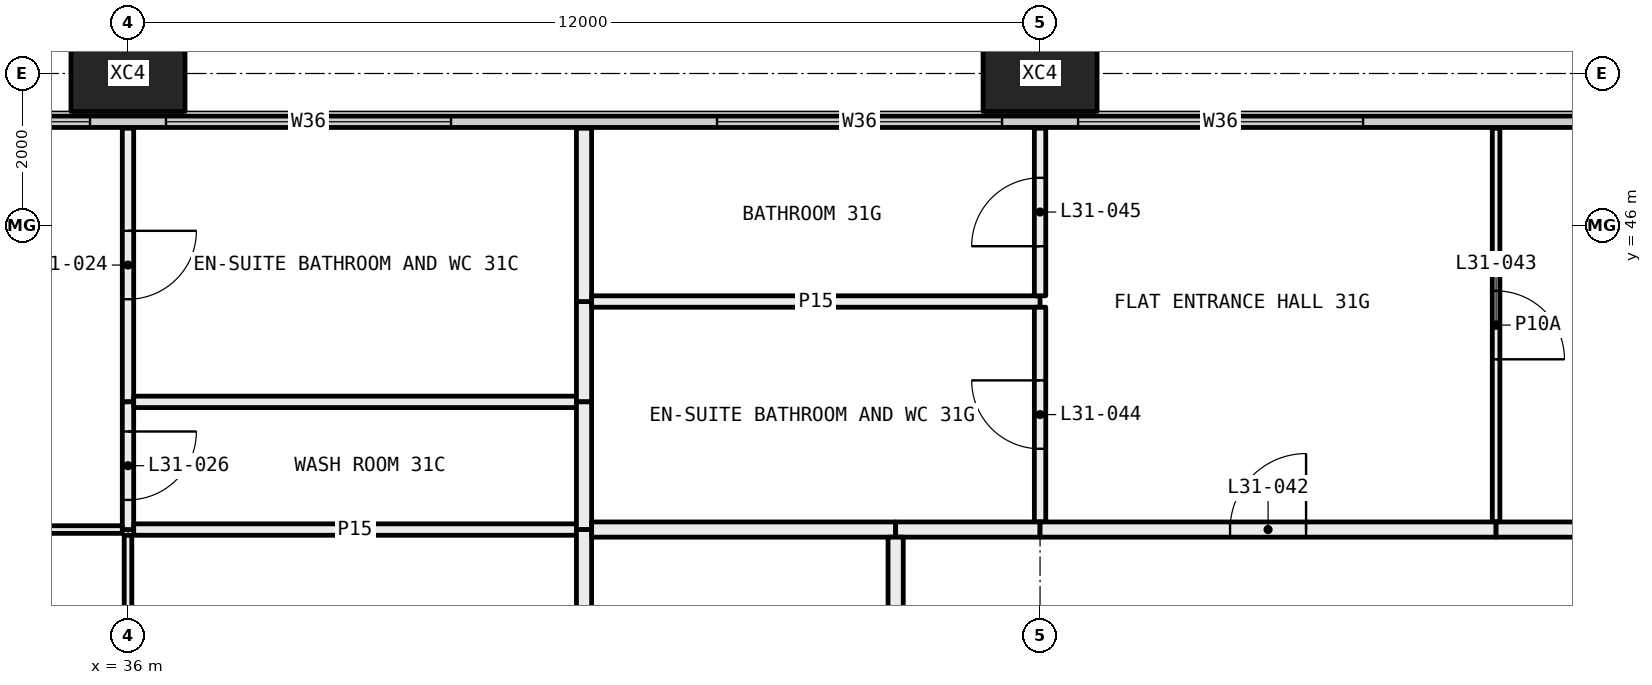
"""IFC4 building model, lengths in metres.
Left out: names, types, materials, properties, quantities, classifications, styles, units other than length and angle.
Written with IfcOpenShell. Run it as: python <this file> out.ifc"""

import sys

from ifc_helpers import new_model, si_unit, direction, frame, frame_2d, origin, origin_2d, place, context, subcontext, project, spatial, rectangle, hollow_rectangle, extrude, element, fill, save


model = new_model("IFC4")
c1 = context("Model", 3, precision=1e-05, world=origin(), true_north=direction((0.0, 1.0)))
c2 = subcontext(c1, "Body", "Model", "MODEL_VIEW")
j1 = project(units=[si_unit("LENGTHUNIT", "METRE"), si_unit("PLANEANGLEUNIT", "RADIAN")], contexts=[c1])
p1 = place(None, origin())
s1 = spatial("IfcSite", under=j1, at=p1, CompositionType="ELEMENT")
p2 = place(p1, origin())
s2 = spatial("IfcBuilding", under=s1, at=p2, CompositionType="ELEMENT")
p3 = place(p2, frame((0.0, 0.0, 120.75)))
s3 = spatial("IfcBuildingStorey", under=s2, at=p3, CompositionType="ELEMENT", Elevation=120.75)
for number, where, z_axis, x_axis in (
    (1, (36.0, 48.0, -0.4), (0.0, 0.0, 1.0), (1.0, 0.0, 0.0)),
    (2, (48.0, 48.0, -0.4), (0.0, 0.0, 1.0), (1.0, 0.0, 0.0)),
):
    element("IfcColumn", number, at=place(p3, frame(where, z_axis=z_axis, x_axis=x_axis)), inside=s3, PredefinedType="COLUMN", context=c2, shape_type="SweptSolid", body=[
        extrude(hollow_rectangle(XDim=1.5, YDim=1.0, WallThickness=0.06, at=origin_2d()), origin(), (0.0, 0.0, 1.0), 3.45),
    ])
p4 = place(p3, frame((6.56, 47.365, 0.0), z_axis=(0.0, 0.0, 1.0), x_axis=(1.0, 0.0, 0.0)))
e3 = element("IfcWall", 3, at=p4, inside=s3, PredefinedType="ELEMENTEDWALL", context=c2, shape_type="SweptSolid", body=[
    extrude(rectangle(XDim=58.88, YDim=0.15, at=frame_2d((29.44, 0.0))), origin(), (0.0, 0.0, 1.0), 3.05),
])
p5 = place(p4, frame((0.44, 0.0, 0.45)))
e4 = element("IfcOpeningElement", 4, at=p5, cuts=e3, PredefinedType="OPENING", context=c2, shape_type="SweptSolid", body=[
    extrude(rectangle(XDim=4.5, YDim=2.55, at=frame_2d((2.25, 1.275))), frame((0.0, 0.085, 0.0), z_axis=(0.0, -1.0, 0.0), x_axis=(1.0, 0.0, 0.0)), (0.0, 0.0, 1.0), 0.17),
])
p6 = place(p4, frame((5.94, 0.0, 0.45)))
e5 = element("IfcOpeningElement", 5, at=p6, cuts=e3, PredefinedType="OPENING", context=c2, shape_type="SweptSolid", body=[
    extrude(rectangle(XDim=3.75, YDim=2.55, at=frame_2d((1.875, 1.275))), frame((0.0, 0.085, 0.0), z_axis=(0.0, -1.0, 0.0), x_axis=(1.0, 0.0, 0.0)), (0.0, 0.0, 1.0), 0.17),
])
p7 = place(p4, frame((13.19, 0.0, 0.45)))
e6 = element("IfcOpeningElement", 6, at=p7, cuts=e3, PredefinedType="OPENING", context=c2, shape_type="SweptSolid", body=[
    extrude(rectangle(XDim=3.75, YDim=2.55, at=frame_2d((1.875, 1.275))), frame((0.0, 0.085, 0.0), z_axis=(0.0, -1.0, 0.0), x_axis=(1.0, 0.0, 0.0)), (0.0, 0.0, 1.0), 0.17),
])
p8 = place(p4, frame((17.94, 0.0, 0.45)))
e7 = element("IfcOpeningElement", 7, at=p8, cuts=e3, PredefinedType="OPENING", context=c2, shape_type="SweptSolid", body=[
    extrude(rectangle(XDim=3.75, YDim=2.55, at=frame_2d((1.875, 1.275))), frame((0.0, 0.085, 0.0), z_axis=(0.0, -1.0, 0.0), x_axis=(1.0, 0.0, 0.0)), (0.0, 0.0, 1.0), 0.17),
])
p9 = place(p4, frame((25.19, 0.0, 0.45)))
e8 = element("IfcOpeningElement", 8, at=p9, cuts=e3, PredefinedType="OPENING", context=c2, shape_type="SweptSolid", body=[
    extrude(rectangle(XDim=0.75, YDim=2.55, at=frame_2d((0.375, 1.275))), frame((0.0, 0.085, 0.0), z_axis=(0.0, -1.0, 0.0), x_axis=(1.0, 0.0, 0.0)), (0.0, 0.0, 1.0), 0.17),
])
p10 = place(p4, frame((26.94, 0.0, 0.45)))
e9 = element("IfcOpeningElement", 9, at=p10, cuts=e3, PredefinedType="OPENING", context=c2, shape_type="SweptSolid", body=[
    extrude(rectangle(XDim=2.0, YDim=2.55, at=frame_2d((1.0, 1.275))), frame((0.0, 0.085, 0.0), z_axis=(0.0, -1.0, 0.0), x_axis=(1.0, 0.0, 0.0)), (0.0, 0.0, 1.0), 0.17),
])
p11 = place(p4, frame((29.94, 0.0, 0.45)))
e10 = element("IfcOpeningElement", 10, at=p11, cuts=e3, PredefinedType="OPENING", context=c2, shape_type="SweptSolid", body=[
    extrude(rectangle(XDim=3.75, YDim=2.55, at=frame_2d((1.875, 1.275))), frame((0.0, 0.085, 0.0), z_axis=(0.0, -1.0, 0.0), x_axis=(1.0, 0.0, 0.0)), (0.0, 0.0, 1.0), 0.17),
])
p12 = place(p4, frame((37.19, 0.0, 0.45)))
e11 = element("IfcOpeningElement", 11, at=p12, cuts=e3, PredefinedType="OPENING", context=c2, shape_type="SweptSolid", body=[
    extrude(rectangle(XDim=3.75, YDim=2.55, at=frame_2d((1.875, 1.275))), frame((0.0, 0.085, 0.0), z_axis=(0.0, -1.0, 0.0), x_axis=(1.0, 0.0, 0.0)), (0.0, 0.0, 1.0), 0.17),
])
p13 = place(p4, frame((41.94, 0.0, 0.45)))
e12 = element("IfcOpeningElement", 12, at=p13, cuts=e3, PredefinedType="OPENING", context=c2, shape_type="SweptSolid", body=[
    extrude(rectangle(XDim=3.75, YDim=2.55, at=frame_2d((1.875, 1.275))), frame((0.0, 0.085, 0.0), z_axis=(0.0, -1.0, 0.0), x_axis=(1.0, 0.0, 0.0)), (0.0, 0.0, 1.0), 0.17),
])
p14 = place(p4, frame((49.19, 0.0, 0.45)))
e13 = element("IfcOpeningElement", 13, at=p14, cuts=e3, PredefinedType="OPENING", context=c2, shape_type="SweptSolid", body=[
    extrude(rectangle(XDim=0.75, YDim=2.55, at=frame_2d((0.375, 1.275))), frame((0.0, 0.085, 0.0), z_axis=(0.0, -1.0, 0.0), x_axis=(1.0, 0.0, 0.0)), (0.0, 0.0, 1.0), 0.17),
])
p15 = place(p4, frame((50.94, 0.0, 0.45)))
e14 = element("IfcOpeningElement", 14, at=p15, cuts=e3, PredefinedType="OPENING", context=c2, shape_type="SweptSolid", body=[
    extrude(rectangle(XDim=2.0, YDim=2.55, at=frame_2d((1.0, 1.275))), frame((0.0, 0.085, 0.0), z_axis=(0.0, -1.0, 0.0), x_axis=(1.0, 0.0, 0.0)), (0.0, 0.0, 1.0), 0.17),
])
p16 = place(p4, frame((53.94, 0.0, 0.45)))
e15 = element("IfcOpeningElement", 15, at=p16, cuts=e3, PredefinedType="OPENING", context=c2, shape_type="SweptSolid", body=[
    extrude(rectangle(XDim=4.5, YDim=2.55, at=frame_2d((2.25, 1.275))), frame((0.0, 0.085, 0.0), z_axis=(0.0, -1.0, 0.0), x_axis=(1.0, 0.0, 0.0)), (0.0, 0.0, 1.0), 0.17),
])
p17 = place(p3, frame((36.0, 43.68, 0.0), z_axis=(0.0, 0.0, 1.0), x_axis=(0.0, 1.0, 0.0)))
e16 = element("IfcWall", 16, at=p17, inside=s3, PredefinedType="PARTITIONING", context=c2, shape_type="SweptSolid", body=[
    extrude(rectangle(XDim=3.6, YDim=0.15, at=frame_2d((1.8, 0.0))), origin(), (0.0, 0.0, 1.0), 2.45),
])
p18 = place(p17, frame((1.35, 0.0, 0.0)))
e17 = element("IfcOpeningElement", 17, at=p18, cuts=e16, PredefinedType="OPENING", context=c2, shape_type="SweptSolid", body=[
    extrude(rectangle(XDim=0.9, YDim=2.1, at=frame_2d((0.45, 1.05))), frame((0.0, 0.085, 0.0), z_axis=(0.0, -1.0, 0.0), x_axis=(1.0, 0.0, 0.0)), (0.0, 0.0, 1.0), 0.17),
])
p19 = place(p3, frame((36.0, 42.0, 0.0), z_axis=(0.0, 0.0, 1.0), x_axis=(0.0, 1.0, 0.0)))
e18 = element("IfcWall", 18, at=p19, inside=s3, PredefinedType="PARTITIONING", context=c2, shape_type="SweptSolid", body=[
    extrude(rectangle(XDim=1.68, YDim=0.15, at=frame_2d((0.84, 0.0))), origin(), (0.0, 0.0, 1.0), 2.45),
])
p20 = place(p19, frame((0.39, 0.0, 0.0)))
e19 = element("IfcOpeningElement", 19, at=p20, cuts=e18, PredefinedType="OPENING", context=c2, shape_type="SweptSolid", body=[
    extrude(rectangle(XDim=0.9, YDim=2.1, at=frame_2d((0.45, 1.05))), frame((0.0, 0.085, 0.0), z_axis=(0.0, -1.0, 0.0), x_axis=(1.0, 0.0, 0.0)), (0.0, 0.0, 1.0), 0.17),
])
p21 = place(p3, frame((31.5, 42.0, 0.0), z_axis=(0.0, 0.0, 1.0), x_axis=(1.0, 0.0, 0.0)))
e20 = element("IfcWall", 20, at=p21, inside=s3, PredefinedType="PARTITIONING", context=c2, shape_type="SweptSolid", body=[
    extrude(rectangle(XDim=4.425, YDim=0.1, at=frame_2d((2.212, 0.0))), origin(), (0.0, 0.0, 1.0), 2.45),
])
p22 = place(p21, frame((1.762, 0.0, 0.0)))
e21 = element("IfcOpeningElement", 21, at=p22, cuts=e20, PredefinedType="OPENING", context=c2, shape_type="SweptSolid", body=[
    extrude(rectangle(XDim=0.9, YDim=2.1, at=frame_2d((0.45, 1.05))), frame((0.0, 0.06, 0.0), z_axis=(0.0, -1.0, 0.0), x_axis=(1.0, 0.0, 0.0)), (0.0, 0.0, 1.0), 0.12),
])
p23 = place(p3, frame((36.075, 43.68, 0.0), z_axis=(0.0, 0.0, 1.0), x_axis=(1.0, 0.0, 0.0)))
e22 = element("IfcWall", 22, at=p23, inside=s3, PredefinedType="PARTITIONING", context=c2, shape_type="SweptSolid", body=[
    extrude(rectangle(XDim=5.825, YDim=0.15, at=frame_2d((2.913, 0.0))), origin(), (0.0, 0.0, 1.0), 2.45),
])
p24 = place(p3, frame((42.0, 43.68, 0.0), z_axis=(0.0, 0.0, 1.0), x_axis=(0.0, 1.0, 0.0)))
e23 = element("IfcWall", 23, at=p24, inside=s3, PredefinedType="PARTITIONING", context=c2, shape_type="SweptSolid", body=[
    extrude(rectangle(XDim=1.32, YDim=0.2, at=frame_2d((0.66, 0.0))), origin(), (0.0, 0.0, 1.0), 3.05),
])
p25 = place(p3, frame((42.0, 45.0, 0.0), z_axis=(0.0, 0.0, 1.0), x_axis=(0.0, 1.0, 0.0)))
e24 = element("IfcWall", 24, at=p25, inside=s3, PredefinedType="PARTITIONING", context=c2, shape_type="SweptSolid", body=[
    extrude(rectangle(XDim=2.28, YDim=0.2, at=frame_2d((1.14, 0.0))), origin(), (0.0, 0.0, 1.0), 3.05),
])
p26 = place(p3, frame((36.075, 42.0, 0.0), z_axis=(0.0, 0.0, 1.0), x_axis=(1.0, 0.0, 0.0)))
e25 = element("IfcWall", 25, at=p26, inside=s3, PredefinedType="PARTITIONING", context=c2, shape_type="SweptSolid", body=[
    extrude(rectangle(XDim=5.825, YDim=0.15, at=frame_2d((2.913, 0.0))), origin(), (0.0, 0.0, 1.0), 2.45),
])
p27 = place(p3, frame((42.0, 42.0, 0.0), z_axis=(0.0, 0.0, 1.0), x_axis=(0.0, 1.0, 0.0)))
e26 = element("IfcWall", 26, at=p27, inside=s3, PredefinedType="PARTITIONING", context=c2, shape_type="SweptSolid", body=[
    extrude(rectangle(XDim=1.68, YDim=0.2, at=frame_2d((0.84, 0.0))), origin(), (0.0, 0.0, 1.0), 3.05),
])
p28 = place(p3, frame((36.0, 36.75, 0.0), z_axis=(0.0, 0.0, 1.0), x_axis=(0.0, 1.0, 0.0)))
e27 = element("IfcWall", 27, at=p28, inside=s3, PredefinedType="PARTITIONING", context=c2, shape_type="SweptSolid", body=[
    extrude(rectangle(XDim=5.175, YDim=0.1, at=frame_2d((2.587, 0.0))), origin(), (0.0, 0.0, 1.0), 2.45),
])
p29 = place(p28, frame((2.137, 0.0, 0.0)))
e28 = element("IfcOpeningElement", 28, at=p29, cuts=e27, PredefinedType="OPENING", context=c2, shape_type="SweptSolid", body=[
    extrude(rectangle(XDim=0.9, YDim=2.1, at=frame_2d((0.45, 1.05))), frame((0.0, 0.06, 0.0), z_axis=(0.0, -1.0, 0.0), x_axis=(1.0, 0.0, 0.0)), (0.0, 0.0, 1.0), 0.12),
])
p30 = place(p3, frame((42.0, 36.1, 0.0), z_axis=(0.0, 0.0, 1.0), x_axis=(0.0, 1.0, 0.0)))
e29 = element("IfcWall", 29, at=p30, inside=s3, PredefinedType="PARTITIONING", context=c2, shape_type="SweptSolid", body=[
    extrude(rectangle(XDim=5.9, YDim=0.2, at=frame_2d((2.95, 0.0))), origin(), (0.0, 0.0, 1.0), 3.05),
])
p31 = place(p3, frame((48.0, 45.0, 0.0), z_axis=(0.0, 0.0, 1.0), x_axis=(-1.0, 0.0, 0.0)))
e30 = element("IfcWall", 30, at=p31, inside=s3, PredefinedType="PARTITIONING", context=c2, shape_type="SweptSolid", body=[
    extrude(rectangle(XDim=5.9, YDim=0.15, at=frame_2d((2.95, 0.0))), origin(), (0.0, 0.0, 1.0), 3.05),
])
p32 = place(p3, frame((48.0, 42.1, 0.0), z_axis=(0.0, 0.0, 1.0), x_axis=(0.0, 1.0, 0.0)))
e31 = element("IfcWall", 31, at=p32, inside=s3, PredefinedType="PARTITIONING", context=c2, shape_type="SweptSolid", body=[
    extrude(rectangle(XDim=2.825, YDim=0.15, at=frame_2d((1.413, 0.0))), origin(), (0.0, 0.0, 1.0), 3.05),
])
p33 = place(p32, frame((0.962, 0.0, 0.0)))
e32 = element("IfcOpeningElement", 32, at=p33, cuts=e31, PredefinedType="OPENING", context=c2, shape_type="SweptSolid", body=[
    extrude(rectangle(XDim=0.9, YDim=2.1, at=frame_2d((0.45, 1.05))), frame((0.0, 0.085, 0.0), z_axis=(0.0, -1.0, 0.0), x_axis=(1.0, 0.0, 0.0)), (0.0, 0.0, 1.0), 0.17),
])
p34 = place(p3, frame((42.1, 42.0, 0.0), z_axis=(0.0, 0.0, 1.0), x_axis=(1.0, 0.0, 0.0)))
e33 = element("IfcWall", 33, at=p34, inside=s3, PredefinedType="PARTITIONING", context=c2, shape_type="SweptSolid", body=[
    extrude(rectangle(XDim=4.0, YDim=0.2, at=frame_2d((2.0, 0.0))), origin(), (0.0, 0.0, 1.0), 3.05),
])
p35 = place(p3, frame((46.1, 42.0, 0.0), z_axis=(0.0, 0.0, 1.0), x_axis=(1.0, 0.0, 0.0)))
e34 = element("IfcWall", 34, at=p35, inside=s3, PredefinedType="PARTITIONING", context=c2, shape_type="SweptSolid", body=[
    extrude(rectangle(XDim=1.9, YDim=0.2, at=frame_2d((0.95, 0.0))), origin(), (0.0, 0.0, 1.0), 3.05),
])
p36 = place(p3, frame((48.0, 45.075, 0.0), z_axis=(0.0, 0.0, 1.0), x_axis=(0.0, 1.0, 0.0)))
e35 = element("IfcWall", 35, at=p36, inside=s3, PredefinedType="PARTITIONING", context=c2, shape_type="SweptSolid", body=[
    extrude(rectangle(XDim=2.205, YDim=0.15, at=frame_2d((1.103, 0.0))), origin(), (0.0, 0.0, 1.0), 3.05),
])
p37 = place(p36, frame((0.653, 0.0, 0.0)))
e36 = element("IfcOpeningElement", 36, at=p37, cuts=e35, PredefinedType="OPENING", context=c2, shape_type="SweptSolid", body=[
    extrude(rectangle(XDim=0.9, YDim=2.1, at=frame_2d((0.45, 1.05))), frame((0.0, 0.085, 0.0), z_axis=(0.0, -1.0, 0.0), x_axis=(1.0, 0.0, 0.0)), (0.0, 0.0, 1.0), 0.17),
])
p38 = place(p3, frame((54.0, 42.1, 0.0), z_axis=(0.0, 0.0, 1.0), x_axis=(0.0, 1.0, 0.0)))
e37 = element("IfcWall", 37, at=p38, inside=s3, PredefinedType="PARTITIONING", context=c2, shape_type="SweptSolid", body=[
    extrude(rectangle(XDim=5.18, YDim=0.1, at=frame_2d((2.59, 0.0))), origin(), (0.0, 0.0, 1.0), 3.05),
])
p39 = place(p38, frame((2.14, 0.0, 0.0)))
e38 = element("IfcOpeningElement", 38, at=p39, cuts=e37, PredefinedType="OPENING", context=c2, shape_type="SweptSolid", body=[
    extrude(rectangle(XDim=0.9, YDim=2.1, at=frame_2d((0.45, 1.05))), frame((0.0, 0.06, 0.0), z_axis=(0.0, -1.0, 0.0), x_axis=(1.0, 0.0, 0.0)), (0.0, 0.0, 1.0), 0.12),
])
p40 = place(p3, frame((48.0, 42.0, 0.0), z_axis=(0.0, 0.0, 1.0), x_axis=(1.0, 0.0, 0.0)))
e39 = element("IfcWall", 39, at=p40, inside=s3, PredefinedType="PARTITIONING", context=c2, shape_type="SweptSolid", body=[
    extrude(rectangle(XDim=6.0, YDim=0.2, at=frame_2d((3.0, 0.0))), origin(), (0.0, 0.0, 1.0), 3.05),
])
p41 = place(p40, frame((2.5, 0.0, 0.0)))
e40 = element("IfcOpeningElement", 40, at=p41, cuts=e39, PredefinedType="OPENING", context=c2, shape_type="SweptSolid", body=[
    extrude(rectangle(XDim=1.0, YDim=2.1, at=frame_2d((0.5, 1.05))), frame((0.0, 0.11, 0.0), z_axis=(0.0, -1.0, 0.0), x_axis=(1.0, 0.0, 0.0)), (0.0, 0.0, 1.0), 0.22),
])
p42 = place(p3, frame((54.0, 42.0, 0.0), z_axis=(0.0, 0.0, 1.0), x_axis=(1.0, 0.0, 0.0)))
e41 = element("IfcWall", 41, at=p42, inside=s3, PredefinedType="PARTITIONING", context=c2, shape_type="SweptSolid", body=[
    extrude(rectangle(XDim=7.8, YDim=0.2, at=frame_2d((3.9, 0.0))), origin(), (0.0, 0.0, 1.0), 3.05),
])
p43 = place(p3, frame((46.1, 36.1, 0.0), z_axis=(0.0, 0.0, 1.0), x_axis=(0.0, 1.0, 0.0)))
e42 = element("IfcWall", 42, at=p43, inside=s3, PredefinedType="PARTITIONING", context=c2, shape_type="SweptSolid", body=[
    extrude(rectangle(XDim=5.8, YDim=0.2, at=frame_2d((2.9, 0.0))), origin(), (0.0, 0.0, 1.0), 3.05),
])
p44 = place(p43, frame((2.45, 0.0, 0.0)))
e43 = element("IfcOpeningElement", 43, at=p44, cuts=e42, PredefinedType="OPENING", context=c2, shape_type="SweptSolid", body=[
    extrude(rectangle(XDim=0.9, YDim=2.1, at=frame_2d((0.45, 1.05))), frame((0.0, 0.11, 0.0), z_axis=(0.0, -1.0, 0.0), x_axis=(1.0, 0.0, 0.0)), (0.0, 0.0, 1.0), 0.22),
])
p45 = place(p10, origin())
e44 = element("IfcWindow", 44, at=p45, inside=s3, PartitioningType="SINGLE_PANEL", PredefinedType="WINDOW", context=c2, shape_type="SweptSolid", body=[
    extrude(rectangle(XDim=2.0, YDim=2.55, at=frame_2d((1.0, 1.275))), frame((0.0, 0.03, 0.0), z_axis=(0.0, -1.0, 0.0), x_axis=(1.0, 0.0, 0.0)), (0.0, 0.0, 1.0), 0.06),
])
fill(e9, e44)
p46 = place(p11, origin())
e45 = element("IfcWindow", 45, at=p46, inside=s3, PartitioningType="SINGLE_PANEL", PredefinedType="WINDOW", context=c2, shape_type="SweptSolid", body=[
    extrude(rectangle(XDim=3.75, YDim=2.55, at=frame_2d((1.875, 1.275))), frame((0.0, 0.03, 0.0), z_axis=(0.0, -1.0, 0.0), x_axis=(1.0, 0.0, 0.0)), (0.0, 0.0, 1.0), 0.06),
])
fill(e10, e45)
p47 = place(p12, origin())
e46 = element("IfcWindow", 46, at=p47, inside=s3, PartitioningType="SINGLE_PANEL", PredefinedType="WINDOW", context=c2, shape_type="SweptSolid", body=[
    extrude(rectangle(XDim=3.75, YDim=2.55, at=frame_2d((1.875, 1.275))), frame((0.0, 0.03, 0.0), z_axis=(0.0, -1.0, 0.0), x_axis=(1.0, 0.0, 0.0)), (0.0, 0.0, 1.0), 0.06),
])
fill(e11, e46)
p48 = place(p13, origin())
e47 = element("IfcWindow", 47, at=p48, inside=s3, PartitioningType="SINGLE_PANEL", PredefinedType="WINDOW", context=c2, shape_type="SweptSolid", body=[
    extrude(rectangle(XDim=3.75, YDim=2.55, at=frame_2d((1.875, 1.275))), frame((0.0, 0.03, 0.0), z_axis=(0.0, -1.0, 0.0), x_axis=(1.0, 0.0, 0.0)), (0.0, 0.0, 1.0), 0.06),
])
fill(e12, e47)
p49 = place(p18, frame((0.9, 0.0, 0.0), x_axis=(-1.0, 0.0, 0.0)))
e48 = element("IfcDoor", 48, at=p49, inside=s3, OperationType="SINGLE_SWING_RIGHT", PredefinedType="DOOR", context=c2, shape_type="SweptSolid", body=[
    extrude(rectangle(XDim=0.9, YDim=2.1, at=frame_2d((0.45, 1.05))), frame((0.0, 0.025, 0.0), z_axis=(0.0, -1.0, 0.0), x_axis=(1.0, 0.0, 0.0)), (0.0, 0.0, 1.0), 0.05),
])
fill(e17, e48)
p50 = place(p20, frame((0.9, 0.0, 0.0), x_axis=(-1.0, 0.0, 0.0)))
e49 = element("IfcDoor", 49, at=p50, inside=s3, OperationType="SINGLE_SWING_RIGHT", PredefinedType="DOOR", context=c2, shape_type="SweptSolid", body=[
    extrude(rectangle(XDim=0.9, YDim=2.1, at=frame_2d((0.45, 1.05))), frame((0.0, 0.025, 0.0), z_axis=(0.0, -1.0, 0.0), x_axis=(1.0, 0.0, 0.0)), (0.0, 0.0, 1.0), 0.05),
])
fill(e19, e49)
p51 = place(p41, origin())
e50 = element("IfcDoor", 50, at=p51, inside=s3, OperationType="SINGLE_SWING_LEFT", PredefinedType="DOOR", context=c2, shape_type="SweptSolid", body=[
    extrude(rectangle(XDim=1.0, YDim=2.1, at=frame_2d((0.5, 1.05))), frame((0.0, 0.025, 0.0), z_axis=(0.0, -1.0, 0.0), x_axis=(1.0, 0.0, 0.0)), (0.0, 0.0, 1.0), 0.05),
])
fill(e40, e50)
p52 = place(p39, frame((0.9, 0.0, 0.0), x_axis=(-1.0, 0.0, 0.0)))
e51 = element("IfcDoor", 51, at=p52, inside=s3, OperationType="SINGLE_SWING_LEFT", PredefinedType="DOOR", context=c2, shape_type="SweptSolid", body=[
    extrude(rectangle(XDim=0.9, YDim=2.1, at=frame_2d((0.45, 1.05))), frame((0.0, 0.025, 0.0), z_axis=(0.0, -1.0, 0.0), x_axis=(1.0, 0.0, 0.0)), (0.0, 0.0, 1.0), 0.05),
])
fill(e38, e51)
p53 = place(p33, origin())
e52 = element("IfcDoor", 52, at=p53, inside=s3, OperationType="SINGLE_SWING_LEFT", PredefinedType="DOOR", context=c2, shape_type="SweptSolid", body=[
    extrude(rectangle(XDim=0.9, YDim=2.1, at=frame_2d((0.45, 1.05))), frame((0.0, 0.025, 0.0), z_axis=(0.0, -1.0, 0.0), x_axis=(1.0, 0.0, 0.0)), (0.0, 0.0, 1.0), 0.05),
])
fill(e32, e52)
p54 = place(p37, origin())
e53 = element("IfcDoor", 53, at=p54, inside=s3, OperationType="SINGLE_SWING_RIGHT", PredefinedType="DOOR", context=c2, shape_type="SweptSolid", body=[
    extrude(rectangle(XDim=0.9, YDim=2.1, at=frame_2d((0.45, 1.05))), frame((0.0, 0.025, 0.0), z_axis=(0.0, -1.0, 0.0), x_axis=(1.0, 0.0, 0.0)), (0.0, 0.0, 1.0), 0.05),
])
fill(e36, e53)
save(model, sys.argv[1])
